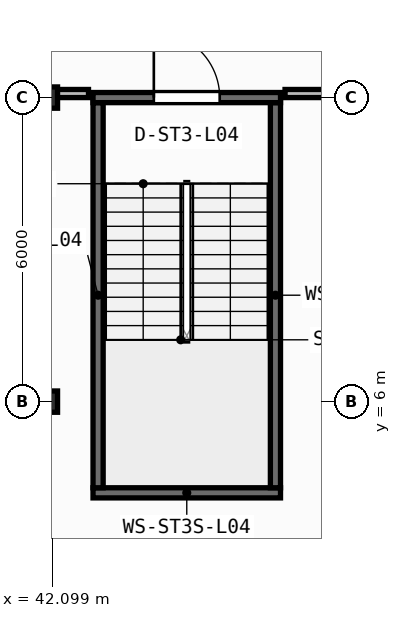
"""IFC4 building model, lengths in metres.
Left out: names, types, materials, properties, quantities, classifications, styles, units other than length and angle.
Written with IfcOpenShell. Run it as: python <this file> out.ifc"""

import sys

from ifc_helpers import new_model, si_unit, direction, frame, frame_2d, origin, origin_2d, place, context, subcontext, project, spatial, rectangle, i_section, extrude, element, fill, save


model = new_model("IFC4")
c1 = context("Model", 3, precision=1e-05, world=origin(), true_north=direction((0.0, 1.0)))
c2 = subcontext(c1, "Body", "Model", "MODEL_VIEW")
j1 = project(units=[si_unit("LENGTHUNIT", "METRE"), si_unit("PLANEANGLEUNIT", "RADIAN")], contexts=[c1])
p1 = place(None, origin())
s1 = spatial("IfcSite", under=j1, at=p1, CompositionType="ELEMENT")
p2 = place(p1, origin())
s2 = spatial("IfcBuilding", under=s1, at=p2, CompositionType="ELEMENT")
p3 = place(p2, frame((0.0, 0.0, 18.0)))
s3 = spatial("IfcBuildingStorey", under=s2, at=p3, CompositionType="ELEMENT", Elevation=18.0)
for number, where, z_axis, x_axis in (
    (1, (42.0, 6.0, 0.0), (0.0, 0.0, 1.0), (1.0, 0.0, 0.0)),
    (2, (42.0, 12.0, 0.0), (0.0, 0.0, 1.0), (1.0, 0.0, 0.0)),
):
    element("IfcColumn", number, at=place(p3, frame(where, z_axis=z_axis, x_axis=x_axis)), inside=s3, PredefinedType="COLUMN", context=c2, shape_type="SweptSolid", body=[
        extrude(i_section(OverallWidth=0.4, OverallDepth=0.42, WebThickness=0.025, FlangeThickness=0.04, at=origin_2d()), origin(), (0.0, 0.0, 1.0), 4.5),
    ])
p4 = place(p3, frame((42.9, 4.2, 0.0), z_axis=(0.0, 0.0, 1.0), x_axis=(1.0, 0.0, 0.0)))
e3 = element("IfcWall", 3, at=p4, inside=s3, PredefinedType="SHEAR", context=c2, shape_type="SweptSolid", body=[
    extrude(rectangle(XDim=3.7, YDim=0.2, at=frame_2d((1.85, 0.0))), origin(), (0.0, 0.0, 1.0), 4.08),
])
for number, where, z_axis, x_axis in (
    (4, (43.0, 4.3, 0.0), (0.0, 0.0, 1.0), (0.0, 1.0, 0.0)),
    (5, (46.5, 4.3, 0.0), (0.0, 0.0, 1.0), (0.0, 1.0, 0.0)),
):
    element("IfcWall", number, at=place(p3, frame(where, z_axis=z_axis, x_axis=x_axis)), inside=s3, PredefinedType="SHEAR", context=c2, shape_type="SweptSolid", body=[
        extrude(rectangle(XDim=7.6, YDim=0.2, at=frame_2d((3.8, 0.0))), origin(), (0.0, 0.0, 1.0), 4.08),
    ])
p5 = place(p3, frame((42.9, 12.0, 0.0), z_axis=(0.0, 0.0, 1.0), x_axis=(1.0, 0.0, 0.0)))
e6 = element("IfcWall", 6, at=p5, inside=s3, PredefinedType="SHEAR", context=c2, shape_type="SweptSolid", body=[
    extrude(rectangle(XDim=3.7, YDim=0.2, at=frame_2d((1.85, 0.0))), origin(), (0.0, 0.0, 1.0), 4.08),
])
p6 = place(p5, frame((1.2, 0.0, 0.0)))
e7 = element("IfcOpeningElement", 7, at=p6, cuts=e6, PredefinedType="OPENING", context=c2, shape_type="SweptSolid", body=[
    extrude(rectangle(XDim=1.3, YDim=2.15, at=frame_2d((0.65, 1.075))), frame((0.0, 0.11, 0.0), z_axis=(0.0, -1.0, 0.0), x_axis=(1.0, 0.0, 0.0)), (0.0, 0.0, 1.0), 0.22),
])
p7 = place(p3, frame((31.63, 12.08, 0.0), z_axis=(0.0, 0.0, 1.0), x_axis=(1.0, 0.0, 0.0)))
e8 = element("IfcWall", 8, at=p7, inside=s3, PredefinedType="PARTITIONING", context=c2, shape_type="SweptSolid", body=[
    extrude(rectangle(XDim=11.181, YDim=0.16, at=frame_2d((5.59, 0.0))), origin(), (0.0, 0.0, 1.0), 3.255),
])
p8 = place(p3, frame((46.689, 12.08, 0.0), z_axis=(0.0, 0.0, 1.0), x_axis=(1.0, 0.0, 0.0)))
e9 = element("IfcWall", 9, at=p8, inside=s3, PredefinedType="PARTITIONING", context=c2, shape_type="SweptSolid", body=[
    extrude(rectangle(XDim=2.843, YDim=0.16, at=frame_2d((1.421, 0.0))), origin(), (0.0, 0.0, 1.0), 3.255),
])
p9 = place(p6, origin())
e10 = element("IfcDoor", 10, at=p9, inside=s3, OperationType="SINGLE_SWING_LEFT", PredefinedType="DOOR", context=c2, shape_type="SweptSolid", body=[
    extrude(rectangle(XDim=1.3, YDim=2.15, at=frame_2d((0.65, 1.075))), frame((0.0, 0.025, 0.0), z_axis=(0.0, -1.0, 0.0), x_axis=(1.0, 0.0, 0.0)), (0.0, 0.0, 1.0), 0.05),
])
fill(e7, e10)
save(model, sys.argv[1])
